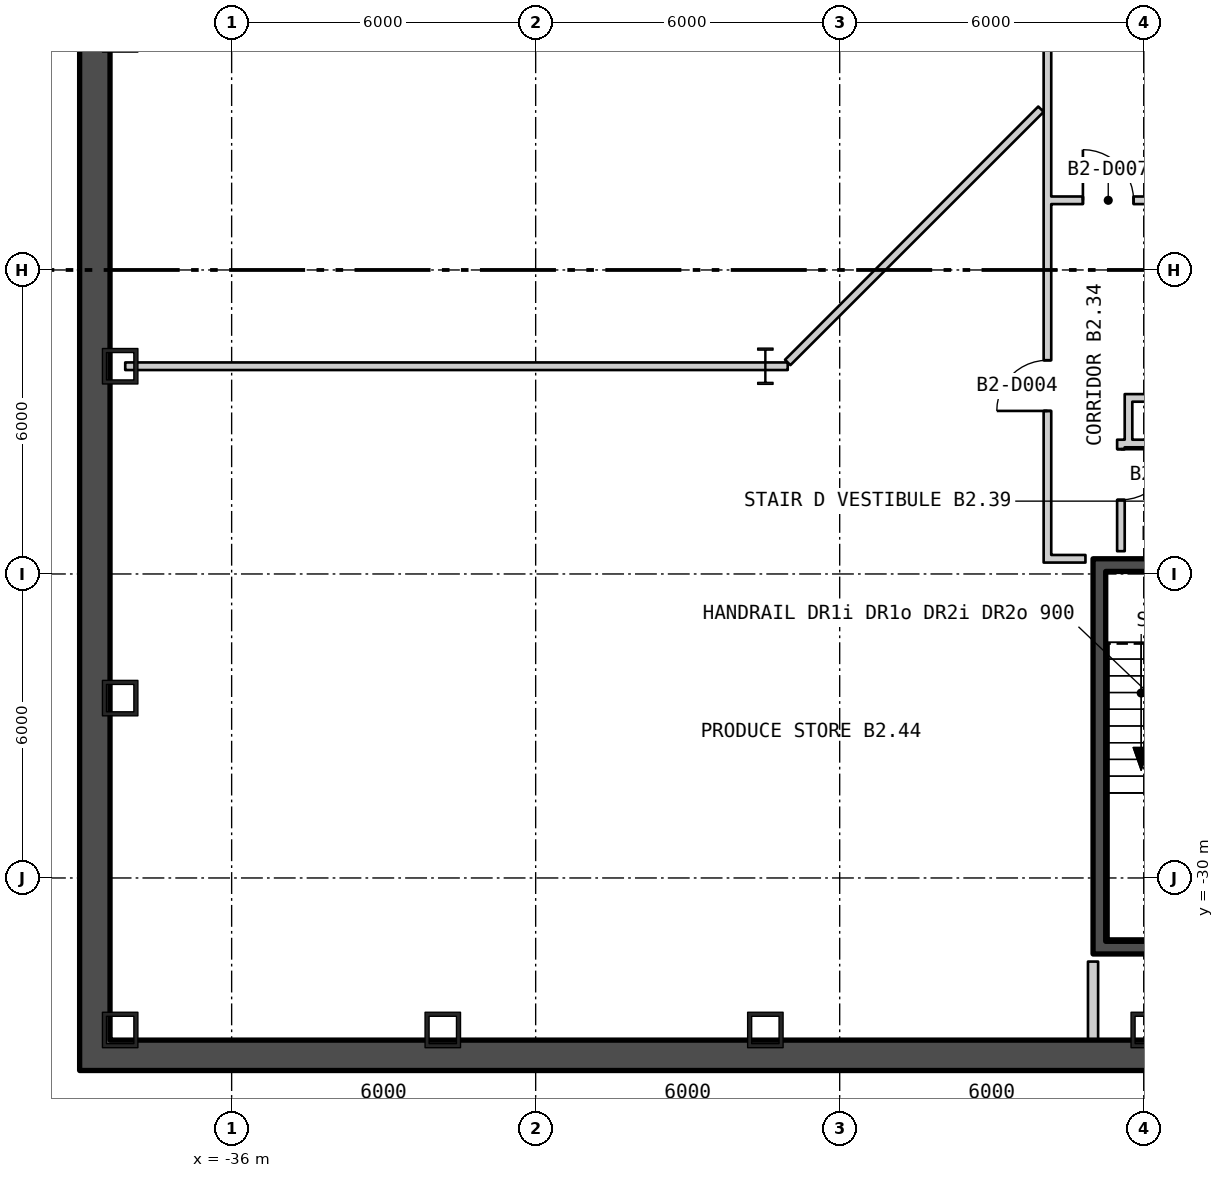
"""IFC4 building model, lengths in metres.
Left out: names, types, materials, properties, quantities, classifications, styles, units other than length and angle.
Written with IfcOpenShell. Run it as: python <this file> out.ifc"""

import sys

from ifc_helpers import new_model, si_unit, direction, frame, frame_2d, origin, origin_2d, place, context, subcontext, project, spatial, rectangle, hollow_rectangle, i_section, extrude, element, fill, save


model = new_model("IFC4")
c1 = context("Model", 3, precision=1e-05, world=origin(), true_north=direction((0.0, 1.0)))
c2 = subcontext(c1, "Body", "Model", "MODEL_VIEW")
j1 = project(units=[si_unit("LENGTHUNIT", "METRE"), si_unit("PLANEANGLEUNIT", "RADIAN")], contexts=[c1])
p1 = place(None, origin())
s1 = spatial("IfcSite", under=j1, at=p1, CompositionType="ELEMENT")
p2 = place(p1, origin())
s2 = spatial("IfcBuilding", under=s1, at=p2, CompositionType="ELEMENT")
p3 = place(p2, frame((0.0, 0.0, -11.4)))
s3 = spatial("IfcBuildingStorey", under=s2, at=p3, CompositionType="ELEMENT", Elevation=-11.4)
for number, where, z_axis, x_axis in (
    (1, (-38.2, -19.9, 0.0), (0.0, 0.0, 1.0), (0.0, -1.0, 0.0)),
    (2, (-38.2, -26.45, 0.0), (0.0, 0.0, 1.0), (0.0, -1.0, 0.0)),
    (3, (-38.2, -33.0, 0.0), (0.0, 0.0, 1.0), (1.0, 0.0, 0.0)),
    (4, (-31.833, -33.0, 0.0), (0.0, 0.0, 1.0), (1.0, 0.0, 0.0)),
    (5, (-25.467, -33.0, 0.0), (0.0, 0.0, 1.0), (1.0, 0.0, 0.0)),
    (6, (-17.9, -33.0, 0.0), (0.0, 0.0, 1.0), (1.0, 0.0, 0.0)),
):
    element("IfcColumn", number, at=place(p3, frame(where, z_axis=z_axis, x_axis=x_axis)), inside=s3, PredefinedType="COLUMN", context=c2, shape_type="SweptSolid", body=[
        extrude(hollow_rectangle(XDim=0.7, YDim=0.7, WallThickness=0.08, at=origin_2d()), origin(), (0.0, 0.0, 1.0), 5.7),
    ])
p4 = place(p3, frame((-25.467, -19.9, 0.0), z_axis=(0.0, 0.0, 1.0), x_axis=(1.0, 0.0, 0.0)))
e7 = element("IfcColumn", 7, at=p4, inside=s3, PredefinedType="COLUMN", context=c2, shape_type="SweptSolid", body=[
    extrude(i_section(OverallWidth=0.304, OverallDepth=0.716, WebThickness=0.021, FlangeThickness=0.04, at=origin_2d()), origin(), (0.0, 0.0, 1.0), 5.7),
])
p5 = place(p3, frame((-39.0, -33.5, -0.4), z_axis=(0.0, 0.0, 1.0), x_axis=(1.0, 0.0, 0.0)))
e8 = element("IfcWall", 8, at=p5, inside=s3, PredefinedType="STANDARD", context=c2, shape_type="SweptSolid", body=[
    extrude(rectangle(XDim=78.0, YDim=0.6, at=frame_2d((39.0, 0.0))), origin(), (0.0, 0.0, 1.0), 5.7),
])
p6 = place(p3, frame((-38.7, -33.2, -0.4), z_axis=(0.0, 0.0, 1.0), x_axis=(0.0, 1.0, 0.0)))
e9 = element("IfcWall", 9, at=p6, inside=s3, PredefinedType="STANDARD", context=c2, shape_type="SweptSolid", body=[
    extrude(rectangle(XDim=52.8, YDim=0.6, at=frame_2d((26.4, 0.0))), origin(), (0.0, 0.0, 1.0), 5.7),
])
p7 = place(p3, frame((-18.875, -31.25, 0.0), z_axis=(0.0, 0.0, 1.0), x_axis=(0.0, 1.0, 0.0)))
e10 = element("IfcWall", 10, at=p7, inside=s3, PredefinedType="SHEAR", context=c2, shape_type="SweptSolid", body=[
    extrude(rectangle(XDim=7.3, YDim=0.25, at=frame_2d((3.65, 0.0))), origin(), (0.0, 0.0, 1.0), 5.25),
])
p8 = place(p3, frame((-19.0, -31.375, 0.0), z_axis=(0.0, 0.0, 1.0), x_axis=(1.0, 0.0, 0.0)))
e11 = element("IfcWall", 11, at=p8, inside=s3, PredefinedType="SHEAR", context=c2, shape_type="SweptSolid", body=[
    extrude(rectangle(XDim=3.5, YDim=0.25, at=frame_2d((1.75, 0.0))), origin(), (0.0, 0.0, 1.0), 5.25),
])
p9 = place(p3, frame((-19.0, -23.825, 0.0), z_axis=(0.0, 0.0, 1.0), x_axis=(1.0, 0.0, 0.0)))
e12 = element("IfcWall", 12, at=p9, inside=s3, PredefinedType="SHEAR", context=c2, shape_type="SweptSolid", body=[
    extrude(rectangle(XDim=3.5, YDim=0.25, at=frame_2d((1.75, 0.0))), origin(), (0.0, 0.0, 1.0), 5.25),
])
p10 = place(p9, frame((1.15, 0.0, 0.0)))
e13 = element("IfcOpeningElement", 13, at=p10, cuts=e12, PredefinedType="OPENING", context=c2, shape_type="SweptSolid", body=[
    extrude(rectangle(XDim=1.2, YDim=2.1, at=frame_2d((0.6, 1.05))), frame((0.0, 0.135, 0.0), z_axis=(0.0, -1.0, 0.0), x_axis=(1.0, 0.0, 0.0)), (0.0, 0.0, 1.0), 0.27),
])
p11 = place(p3, frame((-38.1, -19.9, 0.0), z_axis=(0.0, 0.0, 1.0), x_axis=(1.0, 0.0, 0.0)))
e14 = element("IfcWall", 14, at=p11, inside=s3, PredefinedType="PARTITIONING", context=c2, shape_type="SweptSolid", body=[
    extrude(rectangle(XDim=13.074, YDim=0.15, at=frame_2d((6.537, 0.0))), origin(), (0.0, 0.0, 1.0), 5.25),
])
p12 = place(p3, frame((-25.026, -19.825, 0.0), z_axis=(0.0, 0.0, 1.0), x_axis=(0.707106781187, 0.707106781187, 0.0)))
e15 = element("IfcWall", 15, at=p12, inside=s3, PredefinedType="PARTITIONING", context=c2, shape_type="SweptSolid", body=[
    extrude(rectangle(XDim=7.068, YDim=0.15, at=frame_2d((3.534, 0.0))), origin(), (0.0, 0.0, 1.0), 5.25),
])
p13 = place(p3, frame((-19.9, -23.775, 0.0), z_axis=(0.0, 0.0, 1.0), x_axis=(0.0, 1.0, 0.0)))
e16 = element("IfcWall", 16, at=p13, inside=s3, PredefinedType="PARTITIONING", context=c2, shape_type="SweptSolid", body=[
    extrude(rectangle(XDim=21.187, YDim=0.15, at=frame_2d((10.594, 0.0))), origin(), (0.0, 0.0, 1.0), 5.25),
])
p14 = place(p13, frame((2.993, 0.0, 0.0)))
e17 = element("IfcOpeningElement", 17, at=p14, cuts=e16, PredefinedType="OPENING", context=c2, shape_type="SweptSolid", body=[
    extrude(rectangle(XDim=1.0, YDim=2.1, at=frame_2d((0.5, 1.05))), frame((0.0, 0.085, 0.0), z_axis=(0.0, -1.0, 0.0), x_axis=(1.0, 0.0, 0.0)), (0.0, 0.0, 1.0), 0.17),
])
p15 = place(p13, frame((12.399, 0.0, 0.0)))
e18 = element("IfcOpeningElement", 18, at=p15, cuts=e16, PredefinedType="OPENING", context=c2, shape_type="SweptSolid", body=[
    extrude(rectangle(XDim=1.0, YDim=2.1, at=frame_2d((0.5, 1.05))), frame((0.0, 0.085, 0.0), z_axis=(0.0, -1.0, 0.0), x_axis=(1.0, 0.0, 0.0)), (0.0, 0.0, 1.0), 0.17),
])
p16 = place(p3, frame((-19.825, -23.7, 0.0), z_axis=(0.0, 0.0, 1.0), x_axis=(1.0, 0.0, 0.0)))
e19 = element("IfcWall", 19, at=p16, inside=s3, PredefinedType="PARTITIONING", context=c2, shape_type="SweptSolid", body=[
    extrude(rectangle(XDim=0.675, YDim=0.15, at=frame_2d((0.338, 0.0))), origin(), (0.0, 0.0, 1.0), 5.25),
])
p17 = place(p3, frame((-19.825, -16.625, 0.0), z_axis=(0.0, 0.0, 1.0), x_axis=(1.0, 0.0, 0.0)))
e20 = element("IfcWall", 20, at=p17, inside=s3, PredefinedType="PARTITIONING", context=c2, shape_type="SweptSolid", body=[
    extrude(rectangle(XDim=2.25, YDim=0.15, at=frame_2d((1.125, 0.0))), origin(), (0.0, 0.0, 1.0), 5.25),
])
p18 = place(p17, frame((0.625, 0.0, 0.0)))
e21 = element("IfcOpeningElement", 21, at=p18, cuts=e20, PredefinedType="OPENING", context=c2, shape_type="SweptSolid", body=[
    extrude(rectangle(XDim=1.0, YDim=2.1, at=frame_2d((0.5, 1.05))), frame((0.0, 0.085, 0.0), z_axis=(0.0, -1.0, 0.0), x_axis=(1.0, 0.0, 0.0)), (0.0, 0.0, 1.0), 0.17),
])
p19 = place(p3, frame((-19.0, -33.348, 0.0), z_axis=(0.0, 0.0, 1.0), x_axis=(0.0, 1.0, 0.0)))
e22 = element("IfcWall", 22, at=p19, inside=s3, PredefinedType="PARTITIONING", context=c2, shape_type="SweptSolid", body=[
    extrude(rectangle(XDim=1.698, YDim=0.2, at=frame_2d((0.849, 0.0))), origin(), (0.0, 0.0, 1.0), 5.25),
])
p20 = place(p3, frame((-18.45, -23.55, 0.0), z_axis=(0.0, 0.0, 1.0), x_axis=(0.0, 1.0, 0.0)))
e23 = element("IfcWall", 23, at=p20, inside=s3, PredefinedType="PARTITIONING", context=c2, shape_type="SweptSolid", body=[
    extrude(rectangle(XDim=2.2, YDim=0.15, at=frame_2d((1.1, 0.0))), origin(), (0.0, 0.0, 1.0), 5.25),
])
p21 = place(p20, frame((1.013, 0.0, 0.0)))
e24 = element("IfcOpeningElement", 24, at=p21, cuts=e23, PredefinedType="OPENING", context=c2, shape_type="SweptSolid", body=[
    extrude(rectangle(XDim=1.0, YDim=2.1, at=frame_2d((0.5, 1.05))), frame((0.0, 0.085, 0.0), z_axis=(0.0, -1.0, 0.0), x_axis=(1.0, 0.0, 0.0)), (0.0, 0.0, 1.0), 0.17),
])
p22 = place(p3, frame((-18.3, -21.5, 0.0), z_axis=(0.0, 0.0, 1.0), x_axis=(0.0, 1.0, 0.0)))
e25 = element("IfcWall", 25, at=p22, inside=s3, PredefinedType="PARTITIONING", context=c2, shape_type="SweptSolid", body=[
    extrude(rectangle(XDim=1.05, YDim=0.15, at=frame_2d((0.525, 0.0))), origin(), (0.0, 0.0, 1.0), 5.25),
])
p23 = place(p3, frame((-18.225, -21.425, 0.0), z_axis=(0.0, 0.0, 1.0), x_axis=(1.0, 0.0, 0.0)))
e26 = element("IfcWall", 26, at=p23, inside=s3, PredefinedType="PARTITIONING", context=c2, shape_type="SweptSolid", body=[
    extrude(rectangle(XDim=0.65, YDim=0.15, at=frame_2d((0.325, 0.0))), origin(), (0.0, 0.0, 1.0), 5.25),
])
p24 = place(p3, frame((-18.225, -20.525, 0.0), z_axis=(0.0, 0.0, 1.0), x_axis=(1.0, 0.0, 0.0)))
e27 = element("IfcWall", 27, at=p24, inside=s3, PredefinedType="PARTITIONING", context=c2, shape_type="SweptSolid", body=[
    extrude(rectangle(XDim=0.651, YDim=0.15, at=frame_2d((0.326, 0.0))), origin(), (0.0, 0.0, 1.0), 5.25),
])
p25 = place(p14, origin())
e28 = element("IfcDoor", 28, at=p25, inside=s3, OperationType="SINGLE_SWING_RIGHT", PredefinedType="DOOR", context=c2, shape_type="SweptSolid", body=[
    extrude(rectangle(XDim=1.0, YDim=2.1, at=frame_2d((0.5, 1.05))), frame((0.0, 0.025, 0.0), z_axis=(0.0, -1.0, 0.0), x_axis=(1.0, 0.0, 0.0)), (0.0, 0.0, 1.0), 0.05),
])
fill(e17, e28)
p26 = place(p18, origin())
e29 = element("IfcDoor", 29, at=p26, inside=s3, OperationType="SINGLE_SWING_RIGHT", PredefinedType="DOOR", context=c2, shape_type="SweptSolid", body=[
    extrude(rectangle(XDim=1.0, YDim=2.1, at=frame_2d((0.5, 1.05))), frame((0.0, 0.025, 0.0), z_axis=(0.0, -1.0, 0.0), x_axis=(1.0, 0.0, 0.0)), (0.0, 0.0, 1.0), 0.05),
])
fill(e21, e29)
p27 = place(p21, origin())
e30 = element("IfcDoor", 30, at=p27, inside=s3, OperationType="SINGLE_SWING_RIGHT", PredefinedType="DOOR", context=c2, shape_type="SweptSolid", body=[
    extrude(rectangle(XDim=1.0, YDim=2.1, at=frame_2d((0.5, 1.05))), frame((0.0, 0.025, 0.0), z_axis=(0.0, -1.0, 0.0), x_axis=(1.0, 0.0, 0.0)), (0.0, 0.0, 1.0), 0.05),
])
fill(e24, e30)
save(model, sys.argv[1])
